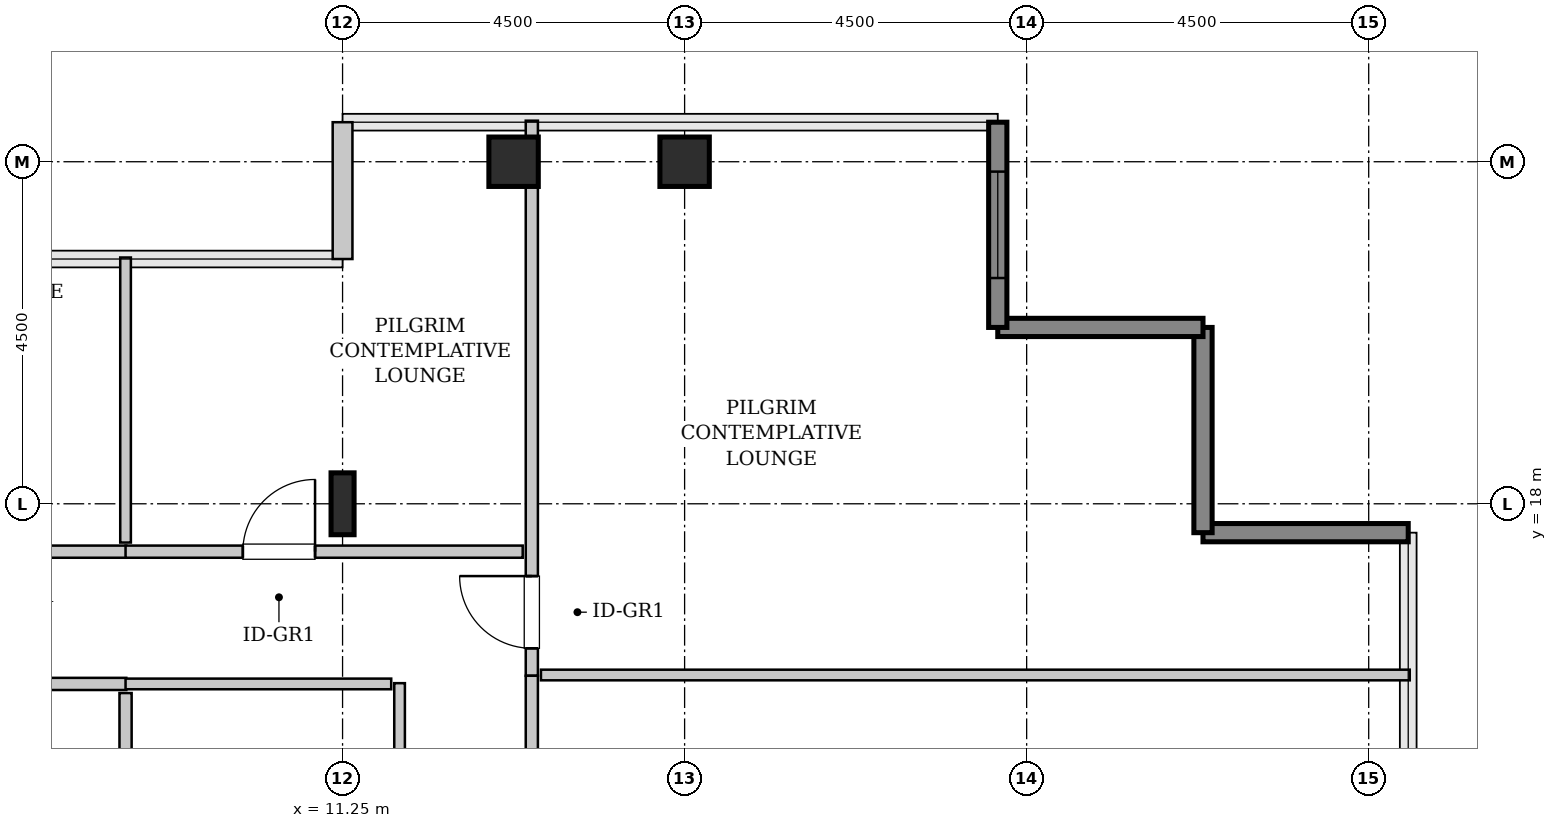
"""IFC4 building model, lengths in metres.
Left out: names, types, materials, properties, quantities, classifications, styles, units other than length and angle.
Written with IfcOpenShell. Run it as: python <this file> out.ifc"""

import sys

from ifc_helpers import new_model, si_unit, direction, frame, frame_2d, origin, origin_2d, place, context, subcontext, project, spatial, rectangle, hollow_rectangle, i_section, extrude, source, transform, mapped, element, fill, save


model = new_model("IFC4")
c1 = context("Model", 3, precision=1e-05, world=origin(), true_north=direction((0.0, 1.0)))
c2 = subcontext(c1, "Body", "Model", "MODEL_VIEW")
j1 = project(units=[si_unit("LENGTHUNIT", "METRE"), si_unit("PLANEANGLEUNIT", "RADIAN")], contexts=[c1])
p1 = place(None, origin())
s1 = spatial("IfcSite", under=j1, at=p1, CompositionType="ELEMENT")
p2 = place(p1, origin())
s2 = spatial("IfcBuilding", under=s1, at=p2, CompositionType="ELEMENT")
p3 = place(p2, frame((0.0, 0.0, 240.8)))
s3 = spatial("IfcBuildingStorey", under=s2, at=p3, CompositionType="ELEMENT", Elevation=240.8)
m1 = source(origin(), c2, "Body", "SweptSolid", [
    extrude(i_section(OverallWidth=0.303, OverallDepth=0.814, WebThickness=0.021, FlangeThickness=0.04, FilletRadius=0.03, at=origin_2d()), origin(), (0.0, 0.0, 1.0), 3.8),
])
p4 = place(p3, frame((11.25, 18.0, 0.0), z_axis=(0.0, 0.0, 1.0), x_axis=(1.0, 0.0, 0.0)))
e1 = element("IfcColumn", 1, at=p4, inside=s3, PredefinedType="COLUMN", context=c2, shape_type="MappedRepresentation", body=[
    mapped(m1, transform((0.0, 0.0, 0.0), x_axis=(1.0, 0.0, 0.0), y_axis=(0.0, 1.0, 0.0), z_axis=(0.0, 0.0, 1.0), scale=1.0)),
])
m2 = source(origin(), c2, "Body", "SweptSolid", [
    extrude(hollow_rectangle(XDim=0.65, YDim=0.65, WallThickness=0.032, InnerFilletRadius=0.032, OuterFilletRadius=0.064, at=origin_2d()), origin(), (0.0, 0.0, 1.0), 3.8),
])
for number, where, z_axis, x_axis in (
    (2, (13.5, 22.5, 0.0), (0.0, 0.0, 1.0), (1.0, 0.0, 0.0)),
    (3, (15.75, 22.5, 0.0), (0.0, 0.0, 1.0), (1.0, 0.0, 0.0)),
):
    element("IfcColumn", number, at=place(p3, frame(where, z_axis=z_axis, x_axis=x_axis)), inside=s3, PredefinedType="COLUMN", context=c2, shape_type="MappedRepresentation", body=[
        mapped(m2, transform((0.0, 0.0, 0.0), x_axis=(1.0, 0.0, 0.0), y_axis=(0.0, 1.0, 0.0), z_axis=(0.0, 0.0, 1.0), scale=1.0)),
    ])
m3 = source(origin(), c2, "Body", "SweptSolid", [
    extrude(rectangle(XDim=2.7, YDim=0.24, at=frame_2d((1.35, 0.0))), origin(), (0.0, 0.0, 1.0), 3.55),
])
for number, where, z_axis, x_axis in (
    (4, (25.27, 17.62, 0.0), (0.0, 0.0, 1.0), (-1.0, 0.0, 0.0)),
    (5, (22.57, 17.62, 0.0), (0.0, 0.0, 1.0), (0.0, 1.0, 0.0)),
    (6, (22.57, 20.32, 0.0), (0.0, 0.0, 1.0), (-1.0, 0.0, 0.0)),
):
    element("IfcWall", number, at=place(p3, frame(where, z_axis=z_axis, x_axis=x_axis)), inside=s3, PredefinedType="SHEAR", context=c2, shape_type="MappedRepresentation", body=[
        mapped(m3, transform((0.0, 0.0, 0.0), x_axis=(1.0, 0.0, 0.0), y_axis=(0.0, 1.0, 0.0), z_axis=(0.0, 0.0, 1.0), scale=1.0)),
    ])
p5 = place(p3, frame((19.87, 20.32, 0.0), z_axis=(0.0, 0.0, 1.0), x_axis=(0.0, 1.0, 0.0)))
e7 = element("IfcWall", 7, at=p5, inside=s3, PredefinedType="SHEAR", context=c2, shape_type="MappedRepresentation", body=[
    mapped(m3, transform((0.0, 0.0, 0.0), x_axis=(1.0, 0.0, 0.0), y_axis=(0.0, 1.0, 0.0), z_axis=(0.0, 0.0, 1.0), scale=1.0)),
])
p6 = place(p5, frame((0.65, 0.0, 0.85)))
e8 = element("IfcOpeningElement", 8, at=p6, cuts=e7, PredefinedType="OPENING", context=c2, shape_type="SweptSolid", body=[
    extrude(rectangle(XDim=1.4, YDim=1.8, at=frame_2d((0.7, 0.9))), frame((0.0, 0.13, 0.0), z_axis=(0.0, -1.0, 0.0), x_axis=(1.0, 0.0, 0.0)), (0.0, 0.0, 1.0), 0.26),
])
m4 = source(origin(), c2, "Body", "SweptSolid", [
    extrude(rectangle(XDim=1.8, YDim=0.26, at=frame_2d((0.9, 0.0))), origin(), (0.0, 0.0, 1.0), 3.55),
])
p7 = place(p3, frame((11.25, 23.02, 0.0), z_axis=(0.0, 0.0, 1.0), x_axis=(0.0, -1.0, 0.0)))
e9 = element("IfcWall", 9, at=p7, inside=s3, PredefinedType="SOLIDWALL", context=c2, shape_type="MappedRepresentation", body=[
    mapped(m4, transform((0.0, 0.0, 0.0), x_axis=(1.0, 0.0, 0.0), y_axis=(0.0, 1.0, 0.0), z_axis=(0.0, 0.0, 1.0), scale=1.0)),
])
m5 = source(origin(), c2, "Body", "SweptSolid", [
    extrude(rectangle(XDim=7.302, YDim=0.16, at=frame_2d((3.651, 0.0))), origin(), (0.0, 0.0, 1.0), 3.535),
])
p8 = place(p3, frame((13.74, 15.738, 0.0), z_axis=(0.0, 0.0, 1.0), x_axis=(0.0, 1.0, 0.0)))
e10 = element("IfcWall", 10, at=p8, inside=s3, PredefinedType="PARTITIONING", context=c2, shape_type="MappedRepresentation", body=[
    mapped(m5, transform((0.0, 0.0, 0.0), x_axis=(1.0, 0.0, 0.0), y_axis=(0.0, 1.0, 0.0), z_axis=(0.0, 0.0, 1.0), scale=1.0)),
])
p9 = place(p8, frame((0.361, 0.0, 0.0)))
e11 = element("IfcOpeningElement", 11, at=p9, cuts=e10, PredefinedType="OPENING", context=c2, shape_type="SweptSolid", body=[
    extrude(rectangle(XDim=0.95, YDim=2.1, at=frame_2d((0.475, 1.05))), frame((0.0, 0.09, 0.0), z_axis=(0.0, -1.0, 0.0), x_axis=(1.0, 0.0, 0.0)), (0.0, 0.0, 1.0), 0.18),
])
m6 = source(origin(), c2, "Body", "SweptSolid", [
    extrude(rectangle(XDim=11.43, YDim=0.14, at=frame_2d((5.715, 0.0))), origin(), (0.0, 0.0, 1.0), 3.535),
])
p10 = place(p3, frame((13.86, 15.748, 0.0), z_axis=(0.0, 0.0, 1.0), x_axis=(1.0, 0.0, 0.0)))
e12 = element("IfcWall", 12, at=p10, inside=s3, PredefinedType="PARTITIONING", context=c2, shape_type="MappedRepresentation", body=[
    mapped(m6, transform((0.0, 0.0, 0.0), x_axis=(1.0, 0.0, 0.0), y_axis=(0.0, 1.0, 0.0), z_axis=(0.0, 0.0, 1.0), scale=1.0)),
])
m7 = source(origin(), c2, "Body", "SweptSolid", [
    extrude(rectangle(XDim=7.242, YDim=0.16, at=frame_2d((3.621, 0.0))), origin(), (0.0, 0.0, 1.0), 3.535),
])
p11 = place(p3, frame((13.74, 8.495, 0.0), z_axis=(0.0, 0.0, 1.0), x_axis=(0.0, 1.0, 0.0)))
e13 = element("IfcWall", 13, at=p11, inside=s3, PredefinedType="PARTITIONING", context=c2, shape_type="MappedRepresentation", body=[
    mapped(m7, transform((0.0, 0.0, 0.0), x_axis=(1.0, 0.0, 0.0), y_axis=(0.0, 1.0, 0.0), z_axis=(0.0, 0.0, 1.0), scale=1.0)),
])
p12 = place(p11, frame((3.146, 0.0, 0.0)))
e14 = element("IfcOpeningElement", 14, at=p12, cuts=e13, PredefinedType="OPENING", context=c2, shape_type="SweptSolid", body=[
    extrude(rectangle(XDim=0.95, YDim=2.1, at=frame_2d((0.475, 1.05))), frame((0.0, 0.09, 0.0), z_axis=(0.0, -1.0, 0.0), x_axis=(1.0, 0.0, 0.0)), (0.0, 0.0, 1.0), 0.18),
])
m8 = source(origin(), c2, "Body", "SweptSolid", [
    extrude(rectangle(XDim=6.21, YDim=0.16, at=frame_2d((3.105, 0.0))), origin(), (0.0, 0.0, 1.0), 3.535),
])
p13 = place(p3, frame((2.195, 17.37, 0.0), z_axis=(0.0, 0.0, 1.0), x_axis=(1.0, 0.0, 0.0)))
e15 = element("IfcWall", 15, at=p13, inside=s3, PredefinedType="PARTITIONING", context=c2, shape_type="MappedRepresentation", body=[
    mapped(m8, transform((0.0, 0.0, 0.0), x_axis=(1.0, 0.0, 0.0), y_axis=(0.0, 1.0, 0.0), z_axis=(0.0, 0.0, 1.0), scale=1.0)),
])
p14 = place(p13, frame((2.63, 0.0, 0.0)))
e16 = element("IfcOpeningElement", 16, at=p14, cuts=e15, PredefinedType="OPENING", context=c2, shape_type="SweptSolid", body=[
    extrude(rectangle(XDim=0.95, YDim=2.1, at=frame_2d((0.475, 1.05))), frame((0.0, 0.09, 0.0), z_axis=(0.0, -1.0, 0.0), x_axis=(1.0, 0.0, 0.0)), (0.0, 0.0, 1.0), 0.18),
])
m9 = source(origin(), c2, "Body", "SweptSolid", [
    extrude(rectangle(XDim=3.75, YDim=0.14, at=frame_2d((1.875, 0.0))), origin(), (0.0, 0.0, 1.0), 3.535),
])
p15 = place(p3, frame((8.395, 17.49, 0.0), z_axis=(0.0, 0.0, 1.0), x_axis=(0.0, 1.0, 0.0)))
e17 = element("IfcWall", 17, at=p15, inside=s3, PredefinedType="PARTITIONING", context=c2, shape_type="MappedRepresentation", body=[
    mapped(m9, transform((0.0, 0.0, 0.0), x_axis=(1.0, 0.0, 0.0), y_axis=(0.0, 1.0, 0.0), z_axis=(0.0, 0.0, 1.0), scale=1.0)),
])
p16 = place(p3, frame((2.195, 15.63, 0.0), z_axis=(0.0, 0.0, 1.0), x_axis=(1.0, 0.0, 0.0)))
e18 = element("IfcWall", 18, at=p16, inside=s3, PredefinedType="PARTITIONING", context=c2, shape_type="MappedRepresentation", body=[
    mapped(m8, transform((0.0, 0.0, 0.0), x_axis=(1.0, 0.0, 0.0), y_axis=(0.0, 1.0, 0.0), z_axis=(0.0, 0.0, 1.0), scale=1.0)),
])
p17 = place(p16, frame((2.63, 0.0, 0.0)))
e19 = element("IfcOpeningElement", 19, at=p17, cuts=e18, PredefinedType="OPENING", context=c2, shape_type="SweptSolid", body=[
    extrude(rectangle(XDim=0.95, YDim=2.1, at=frame_2d((0.475, 1.05))), frame((0.0, 0.09, 0.0), z_axis=(0.0, -1.0, 0.0), x_axis=(1.0, 0.0, 0.0)), (0.0, 0.0, 1.0), 0.18),
])
m10 = source(origin(), c2, "Body", "SweptSolid", [
    extrude(rectangle(XDim=3.93, YDim=0.16, at=frame_2d((1.965, 0.0))), origin(), (0.0, 0.0, 1.0), 3.535),
])
p18 = place(p3, frame((8.395, 11.58, 0.0), z_axis=(0.0, 0.0, 1.0), x_axis=(0.0, 1.0, 0.0)))
e20 = element("IfcWall", 20, at=p18, inside=s3, PredefinedType="PARTITIONING", context=c2, shape_type="MappedRepresentation", body=[
    mapped(m10, transform((0.0, 0.0, 0.0), x_axis=(1.0, 0.0, 0.0), y_axis=(0.0, 1.0, 0.0), z_axis=(0.0, 0.0, 1.0), scale=1.0)),
])
p19 = place(p18, frame((1.49, 0.0, 0.0)))
e21 = element("IfcOpeningElement", 21, at=p19, cuts=e20, PredefinedType="OPENING", context=c2, shape_type="SweptSolid", body=[
    extrude(rectangle(XDim=0.95, YDim=2.1, at=frame_2d((0.475, 1.05))), frame((0.0, 0.09, 0.0), z_axis=(0.0, -1.0, 0.0), x_axis=(1.0, 0.0, 0.0)), (0.0, 0.0, 1.0), 0.18),
])
m11 = source(origin(), c2, "Body", "SweptSolid", [
    extrude(rectangle(XDim=5.225, YDim=0.16, at=frame_2d((2.613, 0.0))), origin(), (0.0, 0.0, 1.0), 3.535),
])
p20 = place(p3, frame((8.395, 17.37, 0.0), z_axis=(0.0, 0.0, 1.0), x_axis=(1.0, 0.0, 0.0)))
e22 = element("IfcWall", 22, at=p20, inside=s3, PredefinedType="PARTITIONING", context=c2, shape_type="MappedRepresentation", body=[
    mapped(m11, transform((0.0, 0.0, 0.0), x_axis=(1.0, 0.0, 0.0), y_axis=(0.0, 1.0, 0.0), z_axis=(0.0, 0.0, 1.0), scale=1.0)),
])
p21 = place(p20, frame((1.543, 0.0, 0.0)))
e23 = element("IfcOpeningElement", 23, at=p21, cuts=e22, PredefinedType="OPENING", context=c2, shape_type="SweptSolid", body=[
    extrude(rectangle(XDim=0.95, YDim=2.1, at=frame_2d((0.475, 1.05))), frame((0.0, 0.09, 0.0), z_axis=(0.0, -1.0, 0.0), x_axis=(1.0, 0.0, 0.0)), (0.0, 0.0, 1.0), 0.18),
])
m12 = source(origin(), c2, "Body", "SweptSolid", [
    extrude(rectangle(XDim=4.18, YDim=0.14, at=frame_2d((2.09, 0.0))), origin(), (0.0, 0.0, 1.0), 3.535),
])
p22 = place(p3, frame((12.0, 11.46, 0.0), z_axis=(0.0, 0.0, 1.0), x_axis=(0.0, 1.0, 0.0)))
e24 = element("IfcWall", 24, at=p22, inside=s3, PredefinedType="PARTITIONING", context=c2, shape_type="MappedRepresentation", body=[
    mapped(m12, transform((0.0, 0.0, 0.0), x_axis=(1.0, 0.0, 0.0), y_axis=(0.0, 1.0, 0.0), z_axis=(0.0, 0.0, 1.0), scale=1.0)),
])
m13 = source(origin(), c2, "Body", "SweptSolid", [
    extrude(rectangle(XDim=3.495, YDim=0.14, at=frame_2d((1.748, 0.0))), origin(), (0.0, 0.0, 1.0), 3.535),
])
p23 = place(p3, frame((8.395, 15.63, 0.0), z_axis=(0.0, 0.0, 1.0), x_axis=(1.0, 0.0, 0.0)))
e25 = element("IfcWall", 25, at=p23, inside=s3, PredefinedType="PARTITIONING", context=c2, shape_type="MappedRepresentation", body=[
    mapped(m13, transform((0.0, 0.0, 0.0), x_axis=(1.0, 0.0, 0.0), y_axis=(0.0, 1.0, 0.0), z_axis=(0.0, 0.0, 1.0), scale=1.0)),
])
m14 = source(origin(), c2, "Body", "SweptSolid", [
    extrude(rectangle(XDim=1.4, YDim=1.8, at=frame_2d((0.7, 0.9))), frame((0.0, 0.03, 0.0), z_axis=(0.0, -1.0, 0.0), x_axis=(1.0, 0.0, 0.0)), (0.0, 0.0, 1.0), 0.06),
])
p24 = place(p6, origin())
e26 = element("IfcWindow", 26, at=p24, inside=s3, PartitioningType="SINGLE_PANEL", PredefinedType="WINDOW", context=c2, shape_type="MappedRepresentation", body=[
    mapped(m14, transform((0.0, 0.0, 0.0), x_axis=(1.0, 0.0, 0.0), y_axis=(0.0, 1.0, 0.0), z_axis=(0.0, 0.0, 1.0), scale=1.0)),
])
fill(e8, e26)
m15 = source(origin(), c2, "Body", "SweptSolid", [
    extrude(rectangle(XDim=0.95, YDim=2.1, at=frame_2d((0.475, 1.05))), frame((0.0, 0.025, 0.0), z_axis=(0.0, -1.0, 0.0), x_axis=(1.0, 0.0, 0.0)), (0.0, 0.0, 1.0), 0.05),
])
p25 = place(p9, origin())
e27 = element("IfcDoor", 27, at=p25, inside=s3, OperationType="SINGLE_SWING_RIGHT", PredefinedType="DOOR", context=c2, shape_type="MappedRepresentation", body=[
    mapped(m15, transform((0.0, 0.0, 0.0), x_axis=(1.0, 0.0, 0.0), y_axis=(0.0, 1.0, 0.0), z_axis=(0.0, 0.0, 1.0), scale=1.0)),
])
fill(e11, e27)
p26 = place(p21, origin())
e28 = element("IfcDoor", 28, at=p26, inside=s3, OperationType="SINGLE_SWING_RIGHT", PredefinedType="DOOR", context=c2, shape_type="MappedRepresentation", body=[
    mapped(m15, transform((0.0, 0.0, 0.0), x_axis=(1.0, 0.0, 0.0), y_axis=(0.0, 1.0, 0.0), z_axis=(0.0, 0.0, 1.0), scale=1.0)),
])
fill(e23, e28)
save(model, sys.argv[1])
